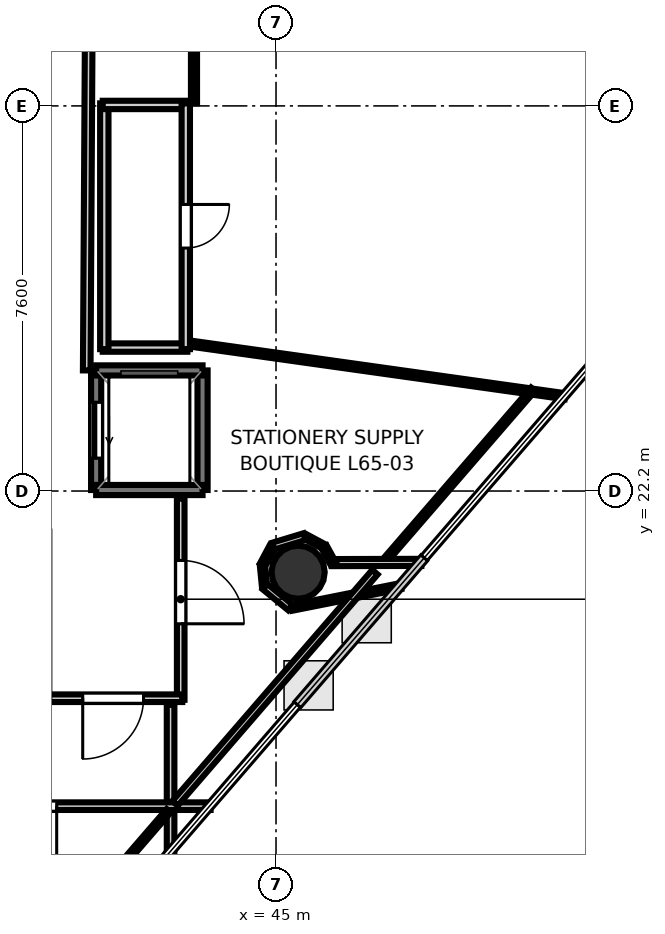
"""IFC4 building model, lengths in metres.
Left out: names, types, materials, properties, quantities, classifications, styles, units other than length and angle.
Written with IfcOpenShell. Run it as: python <this file> out.ifc"""

import sys

from ifc_helpers import new_model, si_unit, direction, frame, frame_2d, origin, origin_2d, place, context, subcontext, project, spatial, rectangle, hollow_circle, extrude, element, fill, save


model = new_model("IFC4")
c1 = context("Model", 3, precision=1e-05, world=origin(), true_north=direction((0.0, 1.0)))
c2 = subcontext(c1, "Body", "Model", "MODEL_VIEW")
j1 = project(units=[si_unit("LENGTHUNIT", "METRE"), si_unit("PLANEANGLEUNIT", "RADIAN")], contexts=[c1])
p1 = place(None, origin())
s1 = spatial("IfcSite", under=j1, at=p1, CompositionType="ELEMENT")
p2 = place(p1, origin())
s2 = spatial("IfcBuilding", under=s1, at=p2, CompositionType="ELEMENT")
p3 = place(p2, frame((0.0, 0.0, 253.8)))
s3 = spatial("IfcBuildingStorey", under=s2, at=p3, CompositionType="ELEMENT", Elevation=253.8)
p4 = place(p3, frame((45.436, 20.598, 0.0), z_axis=(0.0, 0.0, 1.0), x_axis=(1.0, 0.0, 0.0)))
e1 = element("IfcColumn", 1, at=p4, inside=s3, PredefinedType="COLUMN", context=c2, shape_type="SweptSolid", body=[
    extrude(hollow_circle(Radius=0.525, WallThickness=0.028, at=origin_2d()), origin(), (0.0, 0.0, 1.0), 3.7),
])
p5 = place(p3, frame((43.55, 22.22, 0.0), z_axis=(0.0, 0.0, 1.0), x_axis=(0.0, 1.0, 0.0)))
e2 = element("IfcWall", 2, at=p5, inside=s3, PredefinedType="SOLIDWALL", context=c2, shape_type="SweptSolid", body=[
    extrude(rectangle(XDim=2.36, YDim=0.2, at=frame_2d((1.18, 0.0))), origin(), (0.0, 0.0, 1.0), 3.52),
])
p6 = place(p3, frame((41.45, 22.22, 0.0), z_axis=(0.0, 0.0, 1.0), x_axis=(0.0, 1.0, 0.0)))
e3 = element("IfcWall", 3, at=p6, inside=s3, PredefinedType="SOLIDWALL", context=c2, shape_type="SweptSolid", body=[
    extrude(rectangle(XDim=2.36, YDim=0.2, at=frame_2d((1.18, 0.0))), origin(), (0.0, 0.0, 1.0), 3.52),
])
p7 = place(p6, frame((0.63, 0.0, 0.0)))
e4 = element("IfcOpeningElement", 4, at=p7, cuts=e3, PredefinedType="OPENING", context=c2, shape_type="SweptSolid", body=[
    extrude(rectangle(XDim=1.1, YDim=2.15, at=frame_2d((0.55, 1.075))), frame((0.0, 0.11, 0.0), z_axis=(0.0, -1.0, 0.0), x_axis=(1.0, 0.0, 0.0)), (0.0, 0.0, 1.0), 0.22),
])
for number, where, z_axis, x_axis in (
    (5, (41.45, 24.58, 0.0), (0.0, 0.0, 1.0), (1.0, 0.0, 0.0)),
    (6, (41.45, 22.22, 0.0), (0.0, 0.0, 1.0), (1.0, 0.0, 0.0)),
):
    element("IfcWall", number, at=place(p3, frame(where, z_axis=z_axis, x_axis=x_axis)), inside=s3, PredefinedType="SOLIDWALL", context=c2, shape_type="SweptSolid", body=[
        extrude(rectangle(XDim=2.1, YDim=0.2, at=frame_2d((1.05, 0.0))), origin(), (0.0, 0.0, 1.0), 3.52),
    ])
p8 = place(p3, frame((41.313, 32.92, 0.0), z_axis=(0.0, 0.0, 1.0), x_axis=(-0.005942518022, -0.999982343084, 0.0)))
e7 = element("IfcWall", 7, at=p8, inside=s3, PredefinedType="PARTITIONING", context=c2, shape_type="SweptSolid", body=[
    extrude(rectangle(XDim=8.34, YDim=0.15, at=frame_2d((4.17, 0.0))), origin(), (0.0, 0.0, 1.0), 2.84),
])
p9 = place(p3, frame((43.119, 22.05, 0.0), z_axis=(0.0, 0.0, 1.0), x_axis=(0.0, -1.0, 0.0)))
e8 = element("IfcWall", 8, at=p9, inside=s3, PredefinedType="PARTITIONING", context=c2, shape_type="SweptSolid", body=[
    extrude(rectangle(XDim=3.97, YDim=0.15, at=frame_2d((1.985, 0.0))), origin(), (0.0, 0.0, 1.0), 2.84),
])
p10 = place(p9, frame((1.22, 0.0, 0.0)))
e9 = element("IfcOpeningElement", 9, at=p10, cuts=e8, PredefinedType="OPENING", context=c2, shape_type="SweptSolid", body=[
    extrude(rectangle(XDim=1.25, YDim=2.2, at=frame_2d((0.625, 1.1))), frame((0.0, 0.085, 0.0), z_axis=(0.0, -1.0, 0.0), x_axis=(1.0, 0.0, 0.0)), (0.0, 0.0, 1.0), 0.17),
])
p11 = place(p3, frame((43.15, 18.111, 0.0), z_axis=(0.0, 0.0, 1.0), x_axis=(-1.0, 0.0, 0.0)))
e10 = element("IfcWall", 10, at=p11, inside=s3, PredefinedType="PARTITIONING", context=c2, shape_type="SweptSolid", body=[
    extrude(rectangle(XDim=2.73, YDim=0.15, at=frame_2d((1.365, 0.0))), origin(), (0.0, 0.0, 1.0), 2.84),
])
p12 = place(p11, frame((0.765, 0.0, 0.0)))
e11 = element("IfcOpeningElement", 11, at=p12, cuts=e10, PredefinedType="OPENING", context=c2, shape_type="SweptSolid", body=[
    extrude(rectangle(XDim=1.2, YDim=2.15, at=frame_2d((0.6, 1.075))), frame((0.0, 0.085, 0.0), z_axis=(0.0, -1.0, 0.0), x_axis=(1.0, 0.0, 0.0)), (0.0, 0.0, 1.0), 0.17),
])
p13 = place(p3, frame((43.25, 25.031, 0.0), z_axis=(0.0, 0.0, 1.0), x_axis=(-1.0, 0.0, 0.0)))
e12 = element("IfcWall", 12, at=p13, inside=s3, PredefinedType="PLUMBINGWALL", context=c2, shape_type="SweptSolid", body=[
    extrude(rectangle(XDim=1.67, YDim=0.165, at=frame_2d((0.835, 0.0))), origin(), (0.0, 0.0, 1.0), 2.84),
])
p14 = place(p3, frame((41.611, 25.0, 0.0), z_axis=(0.0, 0.0, 1.0), x_axis=(0.0, 1.0, 0.0)))
e13 = element("IfcWall", 13, at=p14, inside=s3, PredefinedType="PLUMBINGWALL", context=c2, shape_type="SweptSolid", body=[
    extrude(rectangle(XDim=4.85, YDim=0.165, at=frame_2d((2.425, 0.0))), origin(), (0.0, 0.0, 1.0), 2.84),
])
p15 = place(p3, frame((41.58, 29.819, 0.0), z_axis=(0.0, 0.0, 1.0), x_axis=(1.0, 0.0, 0.0)))
e14 = element("IfcWall", 14, at=p15, inside=s3, PredefinedType="PLUMBINGWALL", context=c2, shape_type="SweptSolid", body=[
    extrude(rectangle(XDim=1.67, YDim=0.165, at=frame_2d((0.835, 0.0))), origin(), (0.0, 0.0, 1.0), 2.84),
])
p16 = place(p3, frame((43.219, 29.85, 0.0), z_axis=(0.0, 0.0, 1.0), x_axis=(0.0, -1.0, 0.0)))
e15 = element("IfcWall", 15, at=p16, inside=s3, PredefinedType="PLUMBINGWALL", context=c2, shape_type="SweptSolid", body=[
    extrude(rectangle(XDim=4.85, YDim=0.165, at=frame_2d((2.425, 0.0))), origin(), (0.0, 0.0, 1.0), 2.84),
])
p17 = place(p16, frame((1.995, 0.0, 0.0)))
e16 = element("IfcOpeningElement", 16, at=p17, cuts=e15, PredefinedType="OPENING", context=c2, shape_type="SweptSolid", body=[
    extrude(rectangle(XDim=0.86, YDim=2.05, at=frame_2d((0.43, 1.025))), frame((0.0, 0.093, 0.0), z_axis=(0.0, -1.0, 0.0), x_axis=(1.0, 0.0, 0.0)), (0.0, 0.0, 1.0), 0.185),
])
p18 = place(p3, frame((42.919, 17.98, 0.0), z_axis=(0.0, 0.0, 1.0), x_axis=(0.0, -1.0, 0.0)))
e17 = element("IfcWall", 17, at=p18, inside=s3, PredefinedType="PARTITIONING", context=c2, shape_type="SweptSolid", body=[
    extrude(rectangle(XDim=2.909, YDim=0.15, at=frame_2d((1.454, 0.0))), origin(), (0.0, 0.0, 1.0), 2.84),
])
p19 = place(p3, frame((43.708, 15.981, 0.0), z_axis=(0.0, 0.0, 1.0), x_axis=(-1.0, 0.0, 0.0)))
e18 = element("IfcWall", 18, at=p19, inside=s3, PredefinedType="PARTITIONING", context=c2, shape_type="SweptSolid", body=[
    extrude(rectangle(XDim=15.108, YDim=0.15, at=frame_2d((7.554, 0.0))), origin(), (0.0, 0.0, 1.0), 2.84),
])
p20 = place(p19, frame((9.86, 0.0, 0.0)))
e19 = element("IfcOpeningElement", 19, at=p20, cuts=e18, PredefinedType="OPENING", context=c2, shape_type="SweptSolid", body=[
    extrude(rectangle(XDim=1.25, YDim=2.2, at=frame_2d((0.625, 1.1))), frame((0.0, 0.085, 0.0), z_axis=(0.0, -1.0, 0.0), x_axis=(1.0, 0.0, 0.0)), (0.0, 0.0, 1.0), 0.17),
])
p21 = place(p19, frame((3.037, 0.0, 0.0)))
e20 = element("IfcOpeningElement", 20, at=p21, cuts=e18, PredefinedType="OPENING", context=c2, shape_type="SweptSolid", body=[
    extrude(rectangle(XDim=1.25, YDim=2.2, at=frame_2d((0.625, 1.1))), frame((0.0, 0.085, 0.0), z_axis=(0.0, -1.0, 0.0), x_axis=(1.0, 0.0, 0.0)), (0.0, 0.0, 1.0), 0.17),
])
p22 = place(p3, frame((42.881, 15.89, 0.0), z_axis=(0.0, 0.0, 1.0), x_axis=(-0.65403919505, -0.7564606608, 0.0)))
e21 = element("IfcWall", 21, at=p22, inside=s3, PredefinedType="PARTITIONING", context=c2, shape_type="SweptSolid", body=[
    extrude(rectangle(XDim=9.108, YDim=0.105, at=frame_2d((4.554, 0.0))), origin(), (0.0, 0.0, 1.0), 2.84),
])
p23 = place(p3, frame((43.346, 25.105, 0.0), z_axis=(0.0, 0.0, 1.0), x_axis=(0.990268892061, -0.139167242611, 0.0)))
e22 = element("IfcWall", 22, at=p23, inside=s3, PredefinedType="PARTITIONING", context=c2, shape_type="SweptSolid", body=[
    extrude(rectangle(XDim=7.431, YDim=0.12, at=frame_2d((3.716, 0.0))), origin(), (0.0, 0.0, 1.0), 2.84),
])
p24 = place(p3, frame((50.073, 24.208, 0.0), z_axis=(0.0, 0.0, 1.0), x_axis=(-0.65404614334, -0.756454653223, 0.0)))
e23 = element("IfcWall", 23, at=p24, inside=s3, PredefinedType="PARTITIONING", context=c2, shape_type="SweptSolid", body=[
    extrude(rectangle(XDim=4.532, YDim=0.105, at=frame_2d((2.266, 0.0))), origin(), (0.0, 0.0, 1.0), 2.84),
])
p25 = place(p3, frame((47.868, 20.792, 0.0), z_axis=(0.0, 0.0, 1.0), x_axis=(-0.999996909449, -0.002486180162, 0.0)))
e24 = element("IfcWall", 24, at=p25, inside=s3, PredefinedType="PARTITIONING", context=c2, shape_type="SweptSolid", body=[
    extrude(rectangle(XDim=1.768, YDim=0.14, at=frame_2d((0.884, 0.0))), origin(), (0.0, 0.0, 1.0), 2.84),
])
p26 = place(p3, frame((46.127, 20.771, 0.0), z_axis=(0.0, 0.0, 1.0), x_axis=(-0.483302691899, 0.875453315719, 0.0)))
e25 = element("IfcWall", 25, at=p26, inside=s3, PredefinedType="PARTITIONING", context=c2, shape_type="SweptSolid", body=[
    extrude(rectangle(XDim=0.372, YDim=0.12, at=frame_2d((0.186, 0.0))), origin(), (0.0, 0.0, 1.0), 2.84),
])
p27 = place(p3, frame((45.935, 21.11, 0.0), z_axis=(0.0, 0.0, 1.0), x_axis=(-0.881944865518, 0.471352579484, 0.0)))
e26 = element("IfcWall", 26, at=p27, inside=s3, PredefinedType="PARTITIONING", context=c2, shape_type="SweptSolid", body=[
    extrude(rectangle(XDim=0.398, YDim=0.105, at=frame_2d((0.199, 0.0))), origin(), (0.0, 0.0, 1.0), 2.84),
])
p28 = place(p3, frame((45.561, 21.3, 0.0), z_axis=(0.0, 0.0, 1.0), x_axis=(-0.956916224704, -0.290364148784, 0.0)))
e27 = element("IfcWall", 27, at=p28, inside=s3, PredefinedType="PARTITIONING", context=c2, shape_type="SweptSolid", body=[
    extrude(rectangle(XDim=0.646, YDim=0.14, at=frame_2d((0.323, 0.0))), origin(), (0.0, 0.0, 1.0), 2.84),
])
p29 = place(p3, frame((44.924, 21.097, 0.0), z_axis=(0.0, 0.0, 1.0), x_axis=(-0.471607834051, -0.881808398044, 0.0)))
e28 = element("IfcWall", 28, at=p29, inside=s3, PredefinedType="PARTITIONING", context=c2, shape_type="SweptSolid", body=[
    extrude(rectangle(XDim=0.397, YDim=0.12, at=frame_2d((0.199, 0.0))), origin(), (0.0, 0.0, 1.0), 2.84),
])
p30 = place(p3, frame((44.733, 20.729, 0.0), z_axis=(0.0, 0.0, 1.0), x_axis=(0.097619118958, -0.995223847993, 0.0)))
e29 = element("IfcWall", 29, at=p30, inside=s3, PredefinedType="PARTITIONING", context=c2, shape_type="SweptSolid", body=[
    extrude(rectangle(XDim=0.398, YDim=0.105, at=frame_2d((0.199, 0.0))), origin(), (0.0, 0.0, 1.0), 2.84),
])
p31 = place(p3, frame((44.783, 20.312, 0.0), z_axis=(0.0, 0.0, 1.0), x_axis=(0.772878500367, -0.634554035265, 0.0)))
e30 = element("IfcWall", 30, at=p31, inside=s3, PredefinedType="PARTITIONING", context=c2, shape_type="SweptSolid", body=[
    extrude(rectangle(XDim=0.646, YDim=0.14, at=frame_2d((0.323, 0.0))), origin(), (0.0, 0.0, 1.0), 2.84),
])
p32 = place(p3, frame((45.308, 19.896, 0.0), z_axis=(0.0, 0.0, 1.0), x_axis=(0.980807009946, 0.194981048412, 0.0)))
e31 = element("IfcWall", 31, at=p32, inside=s3, PredefinedType="PARTITIONING", context=c2, shape_type="SweptSolid", body=[
    extrude(rectangle(XDim=2.192, YDim=0.12, at=frame_2d((1.096, 0.0))), origin(), (0.0, 0.0, 1.0), 2.84),
])
p33 = place(p3, frame((46.952, 20.599, 0.0), z_axis=(0.0, 0.0, 1.0), x_axis=(-0.654038047912, -0.756461652619, 0.0)))
e32 = element("IfcWall", 32, at=p33, inside=s3, PredefinedType="PARTITIONING", context=c2, shape_type="SweptSolid", body=[
    extrude(rectangle(XDim=6.033, YDim=0.14, at=frame_2d((3.017, 0.0))), origin(), (0.0, 0.0, 1.0), 2.84),
])
p34 = place(p3, frame((43.381, 29.85, 0.0), z_axis=(0.0, 0.0, 1.0), x_axis=(0.0, 1.0, 0.0)))
e33 = element("IfcWall", 33, at=p34, inside=s3, PredefinedType="PARTITIONING", context=c2, shape_type="SweptSolid", body=[
    extrude(rectangle(XDim=2.65, YDim=0.12, at=frame_2d((1.325, 0.0))), origin(), (0.0, 0.0, 1.0), 2.84),
])
p35 = place(p7, origin())
e34 = element("IfcDoor", 34, at=p35, inside=s3, OperationType="SLIDING_TO_LEFT", PredefinedType="DOOR", context=c2, shape_type="SweptSolid", body=[
    extrude(rectangle(XDim=1.1, YDim=2.15, at=frame_2d((0.55, 1.075))), frame((0.0, 0.025, 0.0), z_axis=(0.0, -1.0, 0.0), x_axis=(1.0, 0.0, 0.0)), (0.0, 0.0, 1.0), 0.05),
])
fill(e4, e34)
p36 = place(p12, origin())
e35 = element("IfcDoor", 35, at=p36, inside=s3, OperationType="SINGLE_SWING_RIGHT", PredefinedType="DOOR", context=c2, shape_type="SweptSolid", body=[
    extrude(rectangle(XDim=1.2, YDim=2.15, at=frame_2d((0.6, 1.075))), frame((0.0, 0.025, 0.0), z_axis=(0.0, -1.0, 0.0), x_axis=(1.0, 0.0, 0.0)), (0.0, 0.0, 1.0), 0.05),
])
fill(e11, e35)
p37 = place(p21, origin())
e36 = element("IfcDoor", 36, at=p37, inside=s3, OperationType="SINGLE_SWING_LEFT", PredefinedType="DOOR", context=c2, shape_type="SweptSolid", body=[
    extrude(rectangle(XDim=1.25, YDim=2.2, at=frame_2d((0.625, 1.1))), frame((0.0, 0.025, 0.0), z_axis=(0.0, -1.0, 0.0), x_axis=(1.0, 0.0, 0.0)), (0.0, 0.0, 1.0), 0.05),
])
fill(e20, e36)
p38 = place(p10, origin())
e37 = element("IfcDoor", 37, at=p38, inside=s3, OperationType="SINGLE_SWING_RIGHT", PredefinedType="DOOR", context=c2, shape_type="SweptSolid", body=[
    extrude(rectangle(XDim=1.25, YDim=2.2, at=frame_2d((0.625, 1.1))), frame((0.0, 0.025, 0.0), z_axis=(0.0, -1.0, 0.0), x_axis=(1.0, 0.0, 0.0)), (0.0, 0.0, 1.0), 0.05),
])
fill(e9, e37)
p39 = place(p17, origin())
e38 = element("IfcDoor", 38, at=p39, inside=s3, OperationType="SINGLE_SWING_LEFT", PredefinedType="DOOR", context=c2, shape_type="SweptSolid", body=[
    extrude(rectangle(XDim=0.86, YDim=2.05, at=frame_2d((0.43, 1.025))), frame((0.0, 0.025, 0.0), z_axis=(0.0, -1.0, 0.0), x_axis=(1.0, 0.0, 0.0)), (0.0, 0.0, 1.0), 0.05),
])
fill(e16, e38)
save(model, sys.argv[1])
